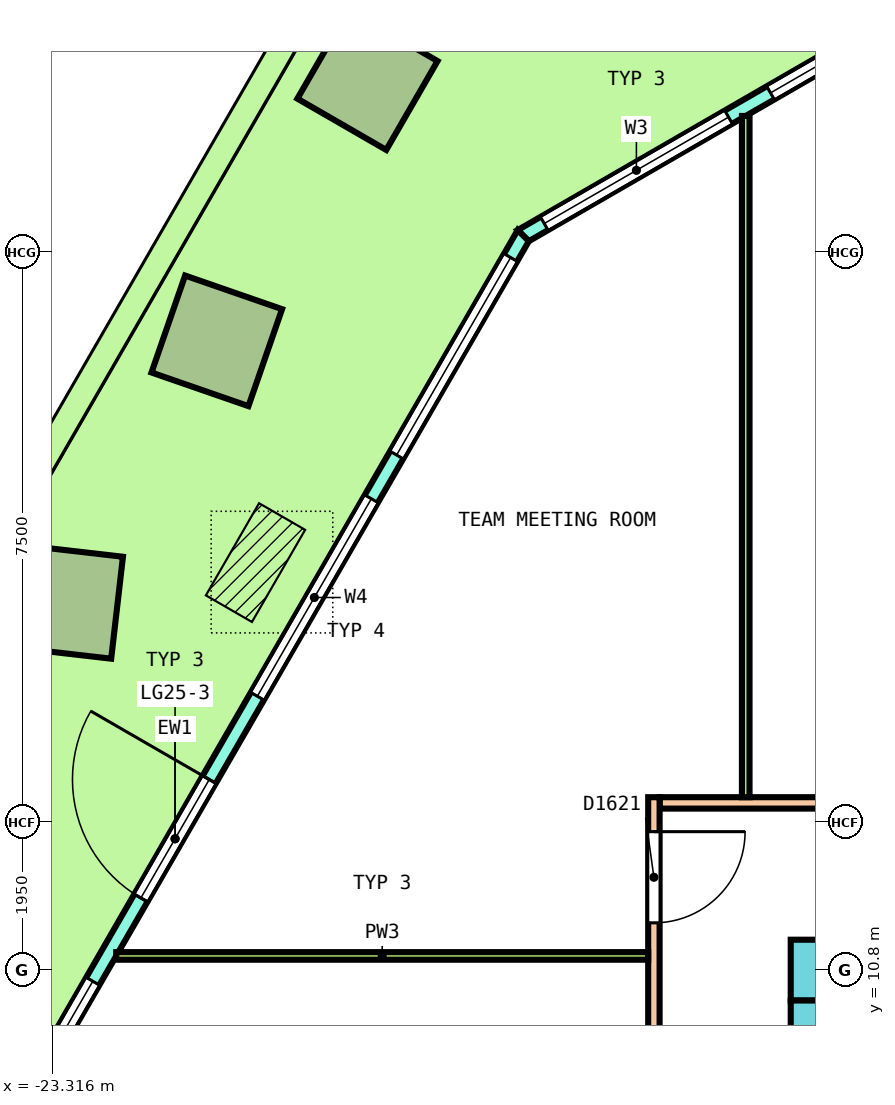
"""IFC4 building model, lengths in metres.
Left out: names, types, materials, properties, quantities, classifications, styles, units other than length and angle.
Written with IfcOpenShell. Run it as: python <this file> out.ifc"""

import sys

from ifc_helpers import new_model, si_unit, direction, frame, frame_2d, origin, origin_2d, place, context, subcontext, project, spatial, polyline, rectangle, outline, extrude, element, fill, save


model = new_model("IFC4")
c1 = context("Model", 3, precision=1e-05, world=origin(), true_north=direction((0.0, 1.0)))
c2 = subcontext(c1, "Body", "Model", "MODEL_VIEW")
j1 = project(units=[si_unit("LENGTHUNIT", "METRE"), si_unit("PLANEANGLEUNIT", "RADIAN")], contexts=[c1])
p1 = place(None, origin())
s1 = spatial("IfcSite", under=j1, at=p1, CompositionType="ELEMENT")
p2 = place(p1, origin())
s2 = spatial("IfcBuilding", under=s1, at=p2, CompositionType="ELEMENT")
p3 = place(p2, frame((0.0, 0.0, 117.6)))
s3 = spatial("IfcBuildingStorey", under=s2, at=p3, CompositionType="ELEMENT", Elevation=117.6)
p4 = place(p3, frame((-19.168, 22.512, 0.0), z_axis=(-0.036267419622, 0.0, 0.999342120734), x_axis=(-0.499424827821, -0.866167613071, -0.018124773713)))
e1 = element("IfcColumn", 1, at=p4, inside=s3, PredefinedType="COLUMN", context=c2, shape_type="SweptSolid", body=[
    extrude(rectangle(XDim=1.35, YDim=1.35, at=origin_2d()), origin(), (0.0, 0.0, 1.0), 4.052),
])
p5 = place(p3, frame((-21.151, 19.079, 0.0), z_axis=(-0.032656153574, 0.006266125409, 0.99944700275), x_axis=(-0.499519802521, -0.866234012369, -0.010890486839)))
e2 = element("IfcColumn", 2, at=p5, inside=s3, PredefinedType="COLUMN", context=c2, shape_type="SweptSolid", body=[
    extrude(rectangle(XDim=1.35, YDim=1.35, at=origin_2d()), origin(), (0.0, 0.0, 1.0), 4.052),
])
p6 = place(p3, frame((-23.133, 15.645, 0.0), z_axis=(-0.028982383936, 0.01259317722, 0.99950059195), x_axis=(-0.500965863044, -0.865459464324, -0.003622109482)))
e3 = element("IfcColumn", 3, at=p6, inside=s3, PredefinedType="COLUMN", context=c2, shape_type="SweptSolid", body=[
    extrude(rectangle(XDim=1.35, YDim=1.35, at=origin_2d()), origin(), (0.0, 0.0, 1.0), 4.052),
])
p7 = place(p3, frame((-11.165, 23.9, 0.0), z_axis=(0.0, 0.0, 1.0), x_axis=(-0.866029458321, -0.49999297727, 0.0)))
e4 = element("IfcWall", 4, at=p7, inside=s3, PredefinedType="SOLIDWALL", context=c2, shape_type="SweptSolid", body=[
    extrude(outline(polyline([(-0.027, -0.1), (1.128, -0.1), (2.282, -0.1), (3.437, -0.1), (4.592, -0.1), (5.747, -0.1), (6.901, -0.1), (6.848, 0.1), (5.711, 0.1), (4.574, 0.1), (3.437, 0.1), (2.301, 0.1), (1.164, 0.1), (0.027, 0.1), (-0.027, -0.1)])), origin(), (0.0, 0.0, 1.0), 4.1),
])
p8 = place(p7, frame((0.319, 0.0, 0.1)))
e5 = element("IfcOpeningElement", 5, at=p8, cuts=e4, PredefinedType="OPENING", context=c2, shape_type="SweptSolid", body=[
    extrude(rectangle(XDim=2.8, YDim=2.9, at=frame_2d((1.4, 1.45))), frame((0.0, 0.11, 0.0), z_axis=(0.0, -1.0, 0.0), x_axis=(1.0, 0.0, 0.0)), (0.0, 0.0, 1.0), 0.22),
])
p9 = place(p7, frame((3.756, 0.0, 0.1)))
e6 = element("IfcOpeningElement", 6, at=p9, cuts=e4, PredefinedType="OPENING", context=c2, shape_type="SweptSolid", body=[
    extrude(rectangle(XDim=2.8, YDim=2.9, at=frame_2d((1.4, 1.45))), frame((0.0, 0.11, 0.0), z_axis=(0.0, -1.0, 0.0), x_axis=(1.0, 0.0, 0.0)), (0.0, 0.0, 1.0), 0.22),
])
p10 = place(p3, frame((-17.119, 20.463, 0.0), z_axis=(0.0, 0.0, 1.0), x_axis=(-0.499998099904, -0.866026500803, 0.0)))
e7 = element("IfcWall", 7, at=p10, inside=s3, PredefinedType="SOLIDWALL", context=c2, shape_type="SweptSolid", body=[
    extrude(outline(polyline([(-0.027, -0.1), (0.994, -0.1), (2.015, -0.1), (3.036, -0.1), (4.057, -0.1), (5.078, -0.1), (6.099, -0.1), (7.12, -0.1), (8.141, -0.1), (9.162, -0.1), (10.183, -0.1), (11.204, -0.1), (12.225, -0.1), (13.246, -0.1), (14.267, -0.1), (15.288, -0.1), (16.309, -0.1), (17.33, -0.1), (18.351, -0.1), (18.297, 0.1), (17.282, 0.1), (16.267, 0.1), (15.252, 0.1), (14.237, 0.1), (13.222, 0.1), (12.207, 0.1), (11.192, 0.1), (10.177, 0.1), (9.162, 0.1), (8.147, 0.1), (7.132, 0.1), (6.117, 0.1), (5.102, 0.1), (4.087, 0.1), (3.072, 0.1), (2.057, 0.1), (1.042, 0.1), (0.027, 0.1), (-0.027, -0.1)])), origin(), (0.0, 0.0, 1.0), 4.1),
])
p11 = place(p10, frame((0.333, 0.0, 0.1)))
e8 = element("IfcOpeningElement", 8, at=p11, cuts=e7, PredefinedType="OPENING", context=c2, shape_type="SweptSolid", body=[
    extrude(rectangle(XDim=3.0, YDim=2.9, at=frame_2d((1.5, 1.45))), frame((0.0, 0.11, 0.0), z_axis=(0.0, -1.0, 0.0), x_axis=(1.0, 0.0, 0.0)), (0.0, 0.0, 1.0), 0.22),
])
p12 = place(p10, frame((3.997, 0.0, 0.1)))
e9 = element("IfcOpeningElement", 9, at=p12, cuts=e7, PredefinedType="OPENING", context=c2, shape_type="SweptSolid", body=[
    extrude(rectangle(XDim=3.0, YDim=2.9, at=frame_2d((1.5, 1.45))), frame((0.0, 0.11, 0.0), z_axis=(0.0, -1.0, 0.0), x_axis=(1.0, 0.0, 0.0)), (0.0, 0.0, 1.0), 0.22),
])
p13 = place(p10, frame((8.262, 0.0, 0.0)))
e10 = element("IfcOpeningElement", 10, at=p13, cuts=e7, PredefinedType="OPENING", context=c2, shape_type="SweptSolid", body=[
    extrude(rectangle(XDim=1.8, YDim=2.4, at=frame_2d((0.9, 1.2))), frame((0.0, 0.11, 0.0), z_axis=(0.0, -1.0, 0.0), x_axis=(1.0, 0.0, 0.0)), (0.0, 0.0, 1.0), 0.22),
])
p14 = place(p10, frame((8.262, 0.0, 2.55)))
e11 = element("IfcOpeningElement", 11, at=p14, cuts=e7, PredefinedType="OPENING", context=c2, shape_type="SweptSolid", body=[
    extrude(rectangle(XDim=1.8, YDim=0.45, at=frame_2d((0.9, 0.225))), frame((0.0, 0.11, 0.0), z_axis=(0.0, -1.0, 0.0), x_axis=(1.0, 0.0, 0.0)), (0.0, 0.0, 1.0), 0.22),
])
p15 = place(p10, frame((11.327, 0.0, 0.1)))
e12 = element("IfcOpeningElement", 12, at=p15, cuts=e7, PredefinedType="OPENING", context=c2, shape_type="SweptSolid", body=[
    extrude(rectangle(XDim=3.0, YDim=2.9, at=frame_2d((1.5, 1.45))), frame((0.0, 0.11, 0.0), z_axis=(0.0, -1.0, 0.0), x_axis=(1.0, 0.0, 0.0)), (0.0, 0.0, 1.0), 0.22),
])
p16 = place(p10, frame((14.991, 0.0, 0.1)))
e13 = element("IfcOpeningElement", 13, at=p16, cuts=e7, PredefinedType="OPENING", context=c2, shape_type="SweptSolid", body=[
    extrude(rectangle(XDim=3.0, YDim=2.9, at=frame_2d((1.5, 1.45))), frame((0.0, 0.11, 0.0), z_axis=(0.0, -1.0, 0.0), x_axis=(1.0, 0.0, 0.0)), (0.0, 0.0, 1.0), 0.22),
])
p17 = place(p3, frame((-13.6, 10.8, 0.0), z_axis=(0.0, 0.0, 1.0), x_axis=(1.0, 0.0, 0.0)))
e14 = element("IfcWall", 14, at=p17, inside=s3, PredefinedType="SHEAR", context=c2, shape_type="SweptSolid", body=[
    extrude(rectangle(XDim=27.2, YDim=0.8, at=frame_2d((13.6, 0.0))), origin(), (0.0, 0.0, 1.0), 4.1),
])
p18 = place(p17, frame((2.308, 0.0, 0.0)))
e15 = element("IfcOpeningElement", 15, at=p18, cuts=e14, PredefinedType="OPENING", context=c2, shape_type="SweptSolid", body=[
    extrude(rectangle(XDim=1.0, YDim=2.1, at=frame_2d((0.5, 1.05))), frame((0.0, 0.41, 0.0), z_axis=(0.0, -1.0, 0.0), x_axis=(1.0, 0.0, 0.0)), (0.0, 0.0, 1.0), 0.82),
])
p19 = place(p17, frame((6.419, 0.0, 0.0)))
e16 = element("IfcOpeningElement", 16, at=p19, cuts=e14, PredefinedType="OPENING", context=c2, shape_type="SweptSolid", body=[
    extrude(rectangle(XDim=1.0, YDim=2.1, at=frame_2d((0.5, 1.05))), frame((0.0, 0.41, 0.0), z_axis=(0.0, -1.0, 0.0), x_axis=(1.0, 0.0, 0.0)), (0.0, 0.0, 1.0), 0.82),
])
p20 = place(p17, frame((10.498, 0.0, 0.0)))
e17 = element("IfcOpeningElement", 17, at=p20, cuts=e14, PredefinedType="OPENING", context=c2, shape_type="SweptSolid", body=[
    extrude(rectangle(XDim=1.0, YDim=2.1, at=frame_2d((0.5, 1.05))), frame((0.0, 0.41, 0.0), z_axis=(0.0, -1.0, 0.0), x_axis=(1.0, 0.0, 0.0)), (0.0, 0.0, 1.0), 0.82),
])
p21 = place(p17, frame((18.035, 0.0, 0.0)))
e18 = element("IfcOpeningElement", 18, at=p21, cuts=e14, PredefinedType="OPENING", context=c2, shape_type="SweptSolid", body=[
    extrude(rectangle(XDim=1.0, YDim=2.1, at=frame_2d((0.5, 1.05))), frame((0.0, 0.41, 0.0), z_axis=(0.0, -1.0, 0.0), x_axis=(1.0, 0.0, 0.0)), (0.0, 0.0, 1.0), 0.82),
])
p22 = place(p17, frame((21.181, 0.0, 0.0)))
e19 = element("IfcOpeningElement", 19, at=p22, cuts=e14, PredefinedType="OPENING", context=c2, shape_type="SweptSolid", body=[
    extrude(rectangle(XDim=1.0, YDim=2.1, at=frame_2d((0.5, 1.05))), frame((0.0, 0.41, 0.0), z_axis=(0.0, -1.0, 0.0), x_axis=(1.0, 0.0, 0.0)), (0.0, 0.0, 1.0), 0.82),
])
p23 = place(p17, frame((24.358, 0.0, 0.0)))
e20 = element("IfcOpeningElement", 20, at=p23, cuts=e14, PredefinedType="OPENING", context=c2, shape_type="SweptSolid", body=[
    extrude(rectangle(XDim=1.0, YDim=2.1, at=frame_2d((0.5, 1.05))), frame((0.0, 0.41, 0.0), z_axis=(0.0, -1.0, 0.0), x_axis=(1.0, 0.0, 0.0)), (0.0, 0.0, 1.0), 0.82),
])
p24 = place(p17, frame((14.525, 0.0, 0.0)))
e21 = element("IfcOpeningElement", 21, at=p24, cuts=e14, PredefinedType="OPENING", context=c2, shape_type="SweptSolid", body=[
    extrude(rectangle(XDim=1.4, YDim=2.1, at=frame_2d((0.7, 1.05))), frame((0.0, 0.41, 0.0), z_axis=(0.0, -1.0, 0.0), x_axis=(1.0, 0.0, 0.0)), (0.0, 0.0, 1.0), 0.82),
])
p25 = place(p3, frame((-13.2, -10.4, 0.0), z_axis=(0.0, 0.0, 1.0), x_axis=(0.0, 1.0, 0.0)))
e22 = element("IfcWall", 22, at=p25, inside=s3, PredefinedType="SHEAR", context=c2, shape_type="SweptSolid", body=[
    extrude(rectangle(XDim=20.8, YDim=0.8, at=frame_2d((10.4, 0.0))), origin(), (0.0, 0.0, 1.0), 4.1),
])
p26 = place(p25, frame((9.2, 0.0, 0.0)))
e23 = element("IfcOpeningElement", 23, at=p26, cuts=e22, PredefinedType="OPENING", context=c2, shape_type="SweptSolid", body=[
    extrude(rectangle(XDim=2.4, YDim=2.1, at=frame_2d((1.2, 1.05))), frame((0.0, 0.41, 0.0), z_axis=(0.0, -1.0, 0.0), x_axis=(1.0, 0.0, 0.0)), (0.0, 0.0, 1.0), 0.82),
])
p27 = place(p25, frame((16.1, 0.0, 0.0)))
e24 = element("IfcOpeningElement", 24, at=p27, cuts=e22, PredefinedType="OPENING", context=c2, shape_type="SweptSolid", body=[
    extrude(rectangle(XDim=1.2, YDim=2.1, at=frame_2d((0.6, 1.05))), frame((0.0, 0.41, 0.0), z_axis=(0.0, -1.0, 0.0), x_axis=(1.0, 0.0, 0.0)), (0.0, 0.0, 1.0), 0.82),
])
p28 = place(p25, frame((3.5, 0.0, 0.0)))
e25 = element("IfcOpeningElement", 25, at=p28, cuts=e22, PredefinedType="OPENING", context=c2, shape_type="SweptSolid", body=[
    extrude(rectangle(XDim=1.2, YDim=2.1, at=frame_2d((0.6, 1.05))), frame((0.0, 0.41, 0.0), z_axis=(0.0, -1.0, 0.0), x_axis=(1.0, 0.0, 0.0)), (0.0, 0.0, 1.0), 0.82),
])
p29 = place(p3, frame((-15.325, 13.0, 0.0), z_axis=(0.0, 0.0, 1.0), x_axis=(1.0, 0.0, 0.0)))
e26 = element("IfcWall", 26, at=p29, inside=s3, PredefinedType="PARTITIONING", context=c2, shape_type="SweptSolid", body=[
    extrude(rectangle(XDim=30.65, YDim=0.15, at=frame_2d((15.325, 0.0))), origin(), (0.0, 0.0, 1.0), 3.05),
])
p30 = place(p29, frame((24.412, 0.0, 0.0)))
e27 = element("IfcOpeningElement", 27, at=p30, cuts=e26, PredefinedType="OPENING", context=c2, shape_type="SweptSolid", body=[
    extrude(rectangle(XDim=1.0, YDim=2.1, at=frame_2d((0.5, 1.05))), frame((0.0, 0.085, 0.0), z_axis=(0.0, -1.0, 0.0), x_axis=(1.0, 0.0, 0.0)), (0.0, 0.0, 1.0), 0.17),
])
p31 = place(p29, frame((12.996, 0.0, 0.0)))
e28 = element("IfcOpeningElement", 28, at=p31, cuts=e26, PredefinedType="OPENING", context=c2, shape_type="SweptSolid", body=[
    extrude(rectangle(XDim=1.2, YDim=2.1, at=frame_2d((0.6, 1.05))), frame((0.0, 0.085, 0.0), z_axis=(0.0, -1.0, 0.0), x_axis=(1.0, 0.0, 0.0)), (0.0, 0.0, 1.0), 0.17),
])
p32 = place(p29, frame((3.435, 0.0, 0.0)))
e29 = element("IfcOpeningElement", 29, at=p32, cuts=e26, PredefinedType="OPENING", context=c2, shape_type="SweptSolid", body=[
    extrude(rectangle(XDim=1.2, YDim=2.1, at=frame_2d((0.6, 1.05))), frame((0.0, 0.085, 0.0), z_axis=(0.0, -1.0, 0.0), x_axis=(1.0, 0.0, 0.0)), (0.0, 0.0, 1.0), 0.17),
])
p33 = place(p3, frame((-15.4, 0.349, 0.0), z_axis=(0.0, 0.0, 1.0), x_axis=(0.0, 1.0, 0.0)))
e30 = element("IfcWall", 30, at=p33, inside=s3, PredefinedType="PARTITIONING", context=c2, shape_type="SweptSolid", body=[
    extrude(rectangle(XDim=12.726, YDim=0.15, at=frame_2d((6.363, 0.0))), origin(), (0.0, 0.0, 1.0), 3.05),
])
p34 = place(p33, frame((11.072, 0.0, 0.0)))
e31 = element("IfcOpeningElement", 31, at=p34, cuts=e30, PredefinedType="OPENING", context=c2, shape_type="SweptSolid", body=[
    extrude(rectangle(XDim=1.2, YDim=2.1, at=frame_2d((0.6, 1.05))), frame((0.0, 0.085, 0.0), z_axis=(0.0, -1.0, 0.0), x_axis=(1.0, 0.0, 0.0)), (0.0, 0.0, 1.0), 0.17),
])
p35 = place(p33, frame((6.254, 0.0, 0.0)))
e32 = element("IfcOpeningElement", 32, at=p35, cuts=e30, PredefinedType="OPENING", context=c2, shape_type="SweptSolid", body=[
    extrude(rectangle(XDim=1.0, YDim=2.1, at=frame_2d((0.5, 1.05))), frame((0.0, 0.085, 0.0), z_axis=(0.0, -1.0, 0.0), x_axis=(1.0, 0.0, 0.0)), (0.0, 0.0, 1.0), 0.17),
])
p36 = place(p3, frame((-14.192, 13.075, 0.0), z_axis=(0.0, 0.0, 1.0), x_axis=(0.0, 1.0, 0.0)))
e33 = element("IfcWall", 33, at=p36, inside=s3, PredefinedType="PARTITIONING", context=c2, shape_type="SweptSolid", body=[
    extrude(rectangle(XDim=8.962, YDim=0.1, at=frame_2d((4.481, 0.0))), origin(), (0.0, 0.0, 1.0), 3.05),
])
p37 = place(p3, frame((-22.474, 10.987, 0.0), z_axis=(0.0, 0.0, 1.0), x_axis=(1.0, 0.0, 0.0)))
e34 = element("IfcWall", 34, at=p37, inside=s3, PredefinedType="PARTITIONING", context=c2, shape_type="SweptSolid", body=[
    extrude(rectangle(XDim=6.999, YDim=0.1, at=frame_2d((3.5, 0.0))), origin(), (0.0, 0.0, 1.0), 3.05),
])
p38 = place(p8, origin())
e35 = element("IfcWindow", 35, at=p38, inside=s3, PartitioningType="SINGLE_PANEL", PredefinedType="WINDOW", context=c2, shape_type="SweptSolid", body=[
    extrude(rectangle(XDim=2.8, YDim=2.9, at=frame_2d((1.4, 1.45))), frame((0.0, 0.03, 0.0), z_axis=(0.0, -1.0, 0.0), x_axis=(1.0, 0.0, 0.0)), (0.0, 0.0, 1.0), 0.06),
])
fill(e5, e35)
p39 = place(p9, origin())
e36 = element("IfcWindow", 36, at=p39, inside=s3, PartitioningType="SINGLE_PANEL", PredefinedType="WINDOW", context=c2, shape_type="SweptSolid", body=[
    extrude(rectangle(XDim=2.8, YDim=2.9, at=frame_2d((1.4, 1.45))), frame((0.0, 0.03, 0.0), z_axis=(0.0, -1.0, 0.0), x_axis=(1.0, 0.0, 0.0)), (0.0, 0.0, 1.0), 0.06),
])
fill(e6, e36)
p40 = place(p11, origin())
e37 = element("IfcWindow", 37, at=p40, inside=s3, PartitioningType="SINGLE_PANEL", PredefinedType="WINDOW", context=c2, shape_type="SweptSolid", body=[
    extrude(rectangle(XDim=3.0, YDim=2.9, at=frame_2d((1.5, 1.45))), frame((0.0, 0.03, 0.0), z_axis=(0.0, -1.0, 0.0), x_axis=(1.0, 0.0, 0.0)), (0.0, 0.0, 1.0), 0.06),
])
fill(e8, e37)
p41 = place(p12, origin())
e38 = element("IfcWindow", 38, at=p41, inside=s3, PartitioningType="SINGLE_PANEL", PredefinedType="WINDOW", context=c2, shape_type="SweptSolid", body=[
    extrude(rectangle(XDim=3.0, YDim=2.9, at=frame_2d((1.5, 1.45))), frame((0.0, 0.03, 0.0), z_axis=(0.0, -1.0, 0.0), x_axis=(1.0, 0.0, 0.0)), (0.0, 0.0, 1.0), 0.06),
])
fill(e9, e38)
p42 = place(p13, origin())
e39 = element("IfcDoor", 39, at=p42, inside=s3, OperationType="DOUBLE_DOOR_SINGLE_SWING", PredefinedType="DOOR", context=c2, shape_type="SweptSolid", body=[
    extrude(rectangle(XDim=1.8, YDim=2.4, at=frame_2d((0.9, 1.2))), frame((0.0, 0.025, 0.0), z_axis=(0.0, -1.0, 0.0), x_axis=(1.0, 0.0, 0.0)), (0.0, 0.0, 1.0), 0.05),
])
fill(e10, e39)
p43 = place(p14, origin())
e40 = element("IfcWindow", 40, at=p43, inside=s3, PartitioningType="SINGLE_PANEL", PredefinedType="WINDOW", context=c2, shape_type="SweptSolid", body=[
    extrude(rectangle(XDim=1.8, YDim=0.45, at=frame_2d((0.9, 0.225))), frame((0.0, 0.03, 0.0), z_axis=(0.0, -1.0, 0.0), x_axis=(1.0, 0.0, 0.0)), (0.0, 0.0, 1.0), 0.06),
])
fill(e11, e40)
p44 = place(p15, origin())
e41 = element("IfcWindow", 41, at=p44, inside=s3, PartitioningType="SINGLE_PANEL", PredefinedType="WINDOW", context=c2, shape_type="SweptSolid", body=[
    extrude(rectangle(XDim=3.0, YDim=2.9, at=frame_2d((1.5, 1.45))), frame((0.0, 0.03, 0.0), z_axis=(0.0, -1.0, 0.0), x_axis=(1.0, 0.0, 0.0)), (0.0, 0.0, 1.0), 0.06),
])
fill(e12, e41)
p45 = place(p34, origin())
e42 = element("IfcDoor", 42, at=p45, inside=s3, OperationType="DOUBLE_DOOR_SINGLE_SWING", PredefinedType="DOOR", context=c2, shape_type="SweptSolid", body=[
    extrude(rectangle(XDim=1.2, YDim=2.1, at=frame_2d((0.6, 1.05))), frame((0.0, 0.025, 0.0), z_axis=(0.0, -1.0, 0.0), x_axis=(1.0, 0.0, 0.0)), (0.0, 0.0, 1.0), 0.05),
])
fill(e31, e42)
save(model, sys.argv[1])
